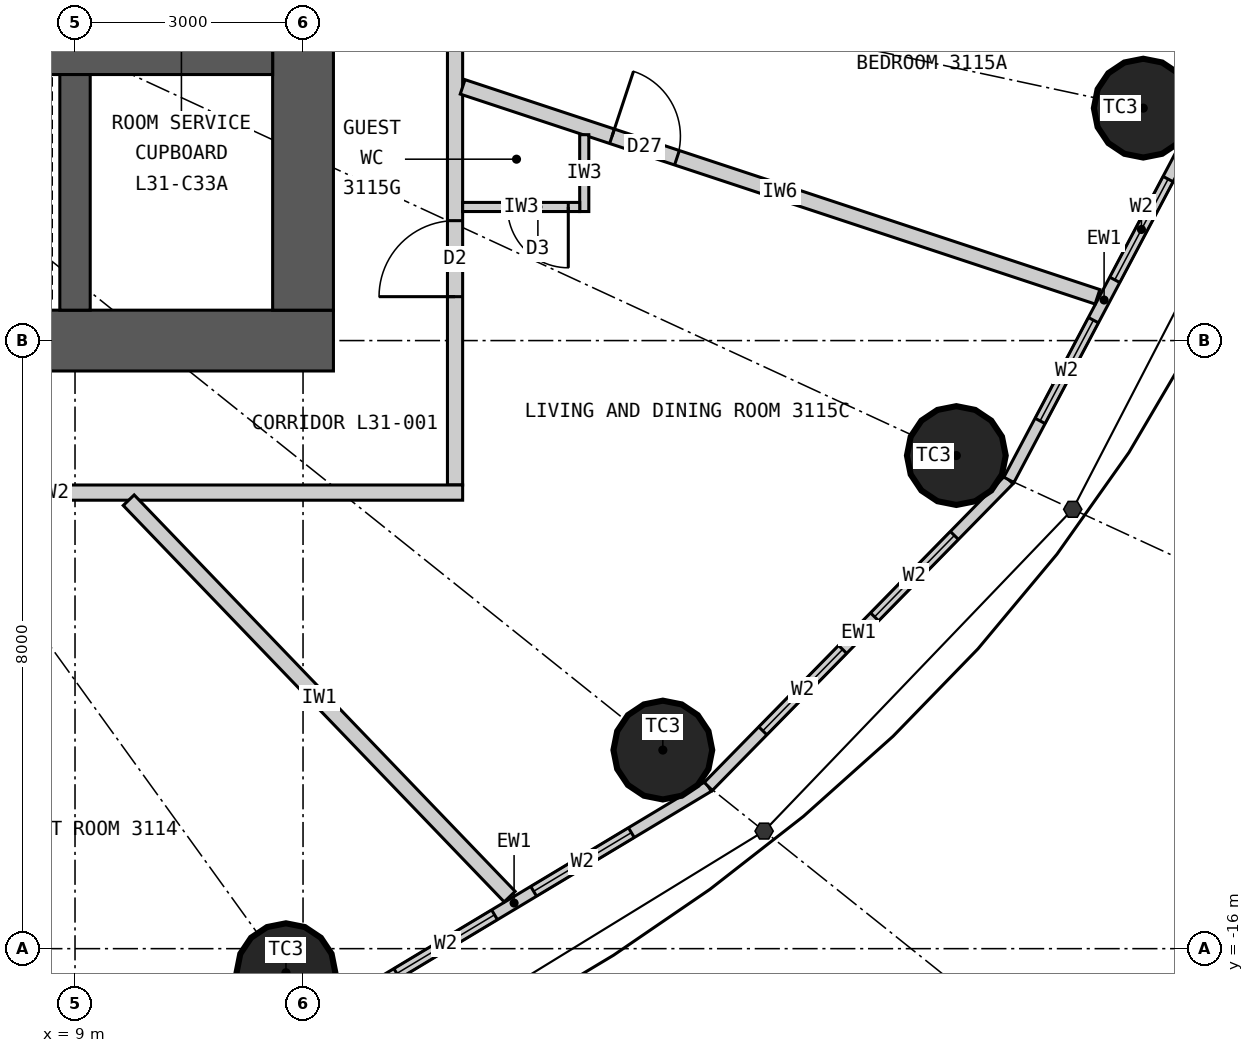
"""IFC4 building model, lengths in metres.
Left out: names, types, materials, properties, quantities, classifications, styles, units other than length and angle.
Written with IfcOpenShell. Run it as: python <this file> out.ifc"""

import sys

from ifc_helpers import new_model, si_unit, direction, frame, frame_2d, origin, origin_2d, place, context, subcontext, project, spatial, rectangle, circle, extrude, element, fill, save


model = new_model("IFC4")
c1 = context("Model", 3, precision=1e-05, world=origin(), true_north=direction((0.0, 1.0)))
c2 = subcontext(c1, "Body", "Model", "MODEL_VIEW")
j1 = project(units=[si_unit("LENGTHUNIT", "METRE"), si_unit("PLANEANGLEUNIT", "RADIAN")], contexts=[c1])
p1 = place(None, origin())
s1 = spatial("IfcSite", under=j1, at=p1, CompositionType="ELEMENT")
p2 = place(p1, origin())
s2 = spatial("IfcBuilding", under=s1, at=p2, CompositionType="ELEMENT")
p3 = place(p2, frame((0.0, 0.0, 122.1)))
s3 = spatial("IfcBuildingStorey", under=s2, at=p3, CompositionType="ELEMENT", Elevation=122.1)
for number, where, z_axis, x_axis in (
    (1, (11.775, -16.316, 0.0), (0.0, 0.0, 1.0), (1.0, 0.0, 0.0)),
    (2, (16.734, -13.387, 0.0), (0.0, 0.0, 1.0), (1.0, 0.0, 0.0)),
    (3, (20.596, -9.513, 0.0), (0.0, 0.0, 1.0), (1.0, 0.0, 0.0)),
    (4, (23.055, -4.942, 0.0), (0.0, 0.0, 1.0), (1.0, 0.0, 0.0)),
):
    element("IfcColumn", number, at=place(p3, frame(where, z_axis=z_axis, x_axis=x_axis)), inside=s3, PredefinedType="COLUMN", context=c2, shape_type="SweptSolid", body=[
        extrude(circle(Radius=0.65, at=origin_2d()), origin(), (0.0, 0.0, 1.0), 3.3),
    ])
p4 = place(p3, frame((12.4, -8.0, 0.0), z_axis=(0.0, 0.0, 1.0), x_axis=(-1.0, 0.0, 0.0)))
e5 = element("IfcWall", 5, at=p4, inside=s3, PredefinedType="SHEAR", context=c2, shape_type="SweptSolid", body=[
    extrude(rectangle(XDim=24.8, YDim=0.8, at=frame_2d((12.4, 0.0))), origin(), (0.0, 0.0, 1.0), 3.3),
])
p5 = place(p4, frame((11.1, 0.0, 0.0)))
e6 = element("IfcOpeningElement", 6, at=p5, cuts=e5, PredefinedType="OPENING", context=c2, shape_type="SweptSolid", body=[
    extrude(rectangle(XDim=1.2, YDim=2.2, at=frame_2d((0.6, 1.1))), frame((0.0, 0.41, 0.0), z_axis=(0.0, -1.0, 0.0), x_axis=(1.0, 0.0, 0.0)), (0.0, 0.0, 1.0), 0.82),
])
p6 = place(p4, frame((18.7, 0.0, 0.0)))
e7 = element("IfcOpeningElement", 7, at=p6, cuts=e5, PredefinedType="OPENING", context=c2, shape_type="SweptSolid", body=[
    extrude(rectangle(XDim=0.9, YDim=2.2, at=frame_2d((0.45, 1.1))), frame((0.0, 0.41, 0.0), z_axis=(0.0, -1.0, 0.0), x_axis=(1.0, 0.0, 0.0)), (0.0, 0.0, 1.0), 0.82),
])
p7 = place(p3, frame((12.0, -7.6, 0.0), z_axis=(0.0, 0.0, 1.0), x_axis=(0.0, 1.0, 0.0)))
e8 = element("IfcWall", 8, at=p7, inside=s3, PredefinedType="SHEAR", context=c2, shape_type="SweptSolid", body=[
    extrude(rectangle(XDim=15.2, YDim=0.8, at=frame_2d((7.6, 0.0))), origin(), (0.0, 0.0, 1.0), 3.3),
])
p8 = place(p7, frame((6.7, 0.0, 0.0)))
e9 = element("IfcOpeningElement", 9, at=p8, cuts=e8, PredefinedType="OPENING", context=c2, shape_type="SweptSolid", body=[
    extrude(rectangle(XDim=1.8, YDim=2.2, at=frame_2d((0.9, 1.1))), frame((0.0, 0.41, 0.0), z_axis=(0.0, -1.0, 0.0), x_axis=(1.0, 0.0, 0.0)), (0.0, 0.0, 1.0), 0.82),
])
p9 = place(p3, frame((-11.6, -4.3, 0.0), z_axis=(0.0, 0.0, 1.0), x_axis=(1.0, 0.0, 0.0)))
e10 = element("IfcWall", 10, at=p9, inside=s3, PredefinedType="SHEAR", context=c2, shape_type="SweptSolid", body=[
    extrude(rectangle(XDim=23.2, YDim=0.4, at=frame_2d((11.6, 0.0))), origin(), (0.0, 0.0, 1.0), 3.3),
])
p10 = place(p3, frame((9.0, -7.6, 0.0), z_axis=(0.0, 0.0, 1.0), x_axis=(0.0, 1.0, 0.0)))
e11 = element("IfcWall", 11, at=p10, inside=s3, PredefinedType="SHEAR", context=c2, shape_type="SweptSolid", body=[
    extrude(rectangle(XDim=3.1, YDim=0.4, at=frame_2d((1.55, 0.0))), origin(), (0.0, 0.0, 1.0), 3.3),
])
p11 = place(p3, frame((12.221, -16.935, 0.0), z_axis=(0.0, 0.0, 1.0), x_axis=(0.857308573723, 0.514802884044, 0.0)))
e12 = element("IfcWall", 12, at=p11, inside=s3, PredefinedType="ELEMENTEDWALL", context=c2, shape_type="SweptSolid", body=[
    extrude(rectangle(XDim=5.961, YDim=0.15, at=frame_2d((2.98, 0.0))), origin(), (0.0, 0.0, 1.0), 3.12),
])
p12 = place(p11, frame((1.181, 0.0, 0.9)))
e13 = element("IfcOpeningElement", 13, at=p12, cuts=e12, PredefinedType="OPENING", context=c2, shape_type="SweptSolid", body=[
    extrude(rectangle(XDim=1.5, YDim=1.9, at=frame_2d((0.75, 0.95))), frame((0.0, 0.085, 0.0), z_axis=(0.0, -1.0, 0.0), x_axis=(1.0, 0.0, 0.0)), (0.0, 0.0, 1.0), 0.17),
])
p13 = place(p11, frame((3.281, 0.0, 0.9)))
e14 = element("IfcOpeningElement", 14, at=p13, cuts=e12, PredefinedType="OPENING", context=c2, shape_type="SweptSolid", body=[
    extrude(rectangle(XDim=1.5, YDim=1.9, at=frame_2d((0.75, 0.95))), frame((0.0, 0.085, 0.0), z_axis=(0.0, -1.0, 0.0), x_axis=(1.0, 0.0, 0.0)), (0.0, 0.0, 1.0), 0.17),
])
p14 = place(p3, frame((17.332, -13.866, 0.0), z_axis=(0.0, 0.0, 1.0), x_axis=(0.700136650834, 0.714008872605, 0.0)))
e15 = element("IfcWall", 15, at=p14, inside=s3, PredefinedType="ELEMENTEDWALL", context=c2, shape_type="SweptSolid", body=[
    extrude(rectangle(XDim=5.649, YDim=0.15, at=frame_2d((2.825, 0.0))), origin(), (0.0, 0.0, 1.0), 3.12),
])
p15 = place(p14, frame((1.025, 0.0, 0.9)))
e16 = element("IfcOpeningElement", 16, at=p15, cuts=e15, PredefinedType="OPENING", context=c2, shape_type="SweptSolid", body=[
    extrude(rectangle(XDim=1.5, YDim=1.9, at=frame_2d((0.75, 0.95))), frame((0.0, 0.085, 0.0), z_axis=(0.0, -1.0, 0.0), x_axis=(1.0, 0.0, 0.0)), (0.0, 0.0, 1.0), 0.17),
])
p16 = place(p14, frame((3.125, 0.0, 0.9)))
e17 = element("IfcOpeningElement", 17, at=p16, cuts=e15, PredefinedType="OPENING", context=c2, shape_type="SweptSolid", body=[
    extrude(rectangle(XDim=1.5, YDim=1.9, at=frame_2d((0.75, 0.95))), frame((0.0, 0.085, 0.0), z_axis=(0.0, -1.0, 0.0), x_axis=(1.0, 0.0, 0.0)), (0.0, 0.0, 1.0), 0.17),
])
p17 = place(p3, frame((21.287, -9.832, 0.0), z_axis=(0.0, 0.0, 1.0), x_axis=(0.467814388454, 0.883826735257, 0.0)))
e18 = element("IfcWall", 18, at=p17, inside=s3, PredefinedType="ELEMENTEDWALL", context=c2, shape_type="SweptSolid", body=[
    extrude(rectangle(XDim=5.354, YDim=0.15, at=frame_2d((2.677, 0.0))), origin(), (0.0, 0.0, 1.0), 3.12),
])
p18 = place(p17, frame((0.877, 0.0, 0.9)))
e19 = element("IfcOpeningElement", 19, at=p18, cuts=e18, PredefinedType="OPENING", context=c2, shape_type="SweptSolid", body=[
    extrude(rectangle(XDim=1.5, YDim=1.9, at=frame_2d((0.75, 0.95))), frame((0.0, 0.085, 0.0), z_axis=(0.0, -1.0, 0.0), x_axis=(1.0, 0.0, 0.0)), (0.0, 0.0, 1.0), 0.17),
])
p19 = place(p17, frame((2.977, 0.0, 0.9)))
e20 = element("IfcOpeningElement", 20, at=p19, cuts=e18, PredefinedType="OPENING", context=c2, shape_type="SweptSolid", body=[
    extrude(rectangle(XDim=1.5, YDim=1.9, at=frame_2d((0.75, 0.95))), frame((0.0, 0.085, 0.0), z_axis=(0.0, -1.0, 0.0), x_axis=(1.0, 0.0, 0.0)), (0.0, 0.0, 1.0), 0.17),
])
p20 = place(p3, frame((14.0, -9.9, 0.0), z_axis=(0.0, 0.0, 1.0), x_axis=(0.0, 1.0, 0.0)))
e21 = element("IfcWall", 21, at=p20, inside=s3, PredefinedType="PARTITIONING", context=c2, shape_type="SweptSolid", body=[
    extrude(rectangle(XDim=19.8, YDim=0.2, at=frame_2d((9.9, 0.0))), origin(), (0.0, 0.0, 1.0), 3.12),
])
p21 = place(p20, frame((2.478, 0.0, 0.0)))
e22 = element("IfcOpeningElement", 22, at=p21, cuts=e21, PredefinedType="OPENING", context=c2, shape_type="SweptSolid", body=[
    extrude(rectangle(XDim=1.0, YDim=2.2, at=frame_2d((0.5, 1.1))), frame((0.0, 0.11, 0.0), z_axis=(0.0, -1.0, 0.0), x_axis=(1.0, 0.0, 0.0)), (0.0, 0.0, 1.0), 0.22),
])
p22 = place(p20, frame((8.838, 0.0, 0.0)))
e23 = element("IfcOpeningElement", 23, at=p22, cuts=e21, PredefinedType="OPENING", context=c2, shape_type="SweptSolid", body=[
    extrude(rectangle(XDim=1.0, YDim=2.2, at=frame_2d((0.5, 1.1))), frame((0.0, 0.11, 0.0), z_axis=(0.0, -1.0, 0.0), x_axis=(1.0, 0.0, 0.0)), (0.0, 0.0, 1.0), 0.22),
])
p23 = place(p20, frame((13.742, 0.0, 0.0)))
e24 = element("IfcOpeningElement", 24, at=p23, cuts=e21, PredefinedType="OPENING", context=c2, shape_type="SweptSolid", body=[
    extrude(rectangle(XDim=1.0, YDim=2.2, at=frame_2d((0.5, 1.1))), frame((0.0, 0.11, 0.0), z_axis=(0.0, -1.0, 0.0), x_axis=(1.0, 0.0, 0.0)), (0.0, 0.0, 1.0), 0.22),
])
p24 = place(p20, frame((18.698, 0.0, 0.0)))
e25 = element("IfcOpeningElement", 25, at=p24, cuts=e21, PredefinedType="OPENING", context=c2, shape_type="SweptSolid", body=[
    extrude(rectangle(XDim=1.0, YDim=2.2, at=frame_2d((0.5, 1.1))), frame((0.0, 0.11, 0.0), z_axis=(0.0, -1.0, 0.0), x_axis=(1.0, 0.0, 0.0)), (0.0, 0.0, 1.0), 0.22),
])
p25 = place(p3, frame((14.1, -10.0, 0.0), z_axis=(0.0, 0.0, 1.0), x_axis=(-1.0, 0.0, 0.0)))
e26 = element("IfcWall", 26, at=p25, inside=s3, PredefinedType="PARTITIONING", context=c2, shape_type="SweptSolid", body=[
    extrude(rectangle(XDim=10.817, YDim=0.2, at=frame_2d((5.409, 0.0))), origin(), (0.0, 0.0, 1.0), 3.12),
])
p26 = place(p3, frame((9.706, -10.1, 0.0), z_axis=(0.0, 0.0, 1.0), x_axis=(0.692944801824, -0.720990639069, 0.0)))
e27 = element("IfcWall", 27, at=p26, inside=s3, PredefinedType="PARTITIONING", context=c2, shape_type="SweptSolid", body=[
    extrude(rectangle(XDim=7.234, YDim=0.2, at=frame_2d((3.617, 0.0))), origin(), (0.0, 0.0, 1.0), 3.12),
])
p27 = place(p3, frame((14.1, -4.662, 0.0), z_axis=(0.0, 0.0, 1.0), x_axis=(0.949446466373, -0.313928984789, 0.0)))
e28 = element("IfcWall", 28, at=p27, inside=s3, PredefinedType="PARTITIONING", context=c2, shape_type="SweptSolid", body=[
    extrude(rectangle(XDim=8.797, YDim=0.2, at=frame_2d((4.399, 0.0))), origin(), (0.0, 0.0, 1.0), 3.12),
])
p28 = place(p27, frame((2.07, 0.0, 0.0)))
e29 = element("IfcOpeningElement", 29, at=p28, cuts=e28, PredefinedType="OPENING", context=c2, shape_type="SweptSolid", body=[
    extrude(rectangle(XDim=0.9, YDim=2.1, at=frame_2d((0.45, 1.05))), frame((0.0, 0.11, 0.0), z_axis=(0.0, -1.0, 0.0), x_axis=(1.0, 0.0, 0.0)), (0.0, 0.0, 1.0), 0.22),
])
p29 = place(p3, frame((15.7, -5.291, 0.0), z_axis=(0.0, 0.0, 1.0), x_axis=(0.0, -1.0, 0.0)))
e30 = element("IfcWall", 30, at=p29, inside=s3, PredefinedType="PARTITIONING", context=c2, shape_type="SweptSolid", body=[
    extrude(rectangle(XDim=1.011, YDim=0.12, at=frame_2d((0.505, 0.0))), origin(), (0.0, 0.0, 1.0), 3.12),
])
p30 = place(p3, frame((14.1, -6.242, 0.0), z_axis=(0.0, 0.0, 1.0), x_axis=(1.0, 0.0, 0.0)))
e31 = element("IfcWall", 31, at=p30, inside=s3, PredefinedType="PARTITIONING", context=c2, shape_type="SweptSolid", body=[
    extrude(rectangle(XDim=1.54, YDim=0.12, at=frame_2d((0.77, 0.0))), origin(), (0.0, 0.0, 1.0), 3.12),
])
p31 = place(p30, frame((0.59, 0.0, 0.0)))
e32 = element("IfcOpeningElement", 32, at=p31, cuts=e31, PredefinedType="OPENING", context=c2, shape_type="SweptSolid", body=[
    extrude(rectangle(XDim=0.8, YDim=2.1, at=frame_2d((0.4, 1.05))), frame((0.0, 0.07, 0.0), z_axis=(0.0, -1.0, 0.0), x_axis=(1.0, 0.0, 0.0)), (0.0, 0.0, 1.0), 0.14),
])
p32 = place(p12, origin())
e33 = element("IfcWindow", 33, at=p32, inside=s3, PartitioningType="SINGLE_PANEL", PredefinedType="WINDOW", context=c2, shape_type="SweptSolid", body=[
    extrude(rectangle(XDim=1.5, YDim=1.9, at=frame_2d((0.75, 0.95))), frame((0.0, 0.03, 0.0), z_axis=(0.0, -1.0, 0.0), x_axis=(1.0, 0.0, 0.0)), (0.0, 0.0, 1.0), 0.06),
])
fill(e13, e33)
p33 = place(p13, origin())
e34 = element("IfcWindow", 34, at=p33, inside=s3, PartitioningType="SINGLE_PANEL", PredefinedType="WINDOW", context=c2, shape_type="SweptSolid", body=[
    extrude(rectangle(XDim=1.5, YDim=1.9, at=frame_2d((0.75, 0.95))), frame((0.0, 0.03, 0.0), z_axis=(0.0, -1.0, 0.0), x_axis=(1.0, 0.0, 0.0)), (0.0, 0.0, 1.0), 0.06),
])
fill(e14, e34)
p34 = place(p15, origin())
e35 = element("IfcWindow", 35, at=p34, inside=s3, PartitioningType="SINGLE_PANEL", PredefinedType="WINDOW", context=c2, shape_type="SweptSolid", body=[
    extrude(rectangle(XDim=1.5, YDim=1.9, at=frame_2d((0.75, 0.95))), frame((0.0, 0.03, 0.0), z_axis=(0.0, -1.0, 0.0), x_axis=(1.0, 0.0, 0.0)), (0.0, 0.0, 1.0), 0.06),
])
fill(e16, e35)
p35 = place(p16, origin())
e36 = element("IfcWindow", 36, at=p35, inside=s3, PartitioningType="SINGLE_PANEL", PredefinedType="WINDOW", context=c2, shape_type="SweptSolid", body=[
    extrude(rectangle(XDim=1.5, YDim=1.9, at=frame_2d((0.75, 0.95))), frame((0.0, 0.03, 0.0), z_axis=(0.0, -1.0, 0.0), x_axis=(1.0, 0.0, 0.0)), (0.0, 0.0, 1.0), 0.06),
])
fill(e17, e36)
p36 = place(p18, origin())
e37 = element("IfcWindow", 37, at=p36, inside=s3, PartitioningType="SINGLE_PANEL", PredefinedType="WINDOW", context=c2, shape_type="SweptSolid", body=[
    extrude(rectangle(XDim=1.5, YDim=1.9, at=frame_2d((0.75, 0.95))), frame((0.0, 0.03, 0.0), z_axis=(0.0, -1.0, 0.0), x_axis=(1.0, 0.0, 0.0)), (0.0, 0.0, 1.0), 0.06),
])
fill(e19, e37)
p37 = place(p19, origin())
e38 = element("IfcWindow", 38, at=p37, inside=s3, PartitioningType="SINGLE_PANEL", PredefinedType="WINDOW", context=c2, shape_type="SweptSolid", body=[
    extrude(rectangle(XDim=1.5, YDim=1.9, at=frame_2d((0.75, 0.95))), frame((0.0, 0.03, 0.0), z_axis=(0.0, -1.0, 0.0), x_axis=(1.0, 0.0, 0.0)), (0.0, 0.0, 1.0), 0.06),
])
fill(e20, e38)
p38 = place(p31, origin())
e39 = element("IfcDoor", 39, at=p38, inside=s3, OperationType="SINGLE_SWING_RIGHT", PredefinedType="DOOR", context=c2, shape_type="SweptSolid", body=[
    extrude(rectangle(XDim=0.8, YDim=2.1, at=frame_2d((0.4, 1.05))), frame((0.0, 0.025, 0.0), z_axis=(0.0, -1.0, 0.0), x_axis=(1.0, 0.0, 0.0)), (0.0, 0.0, 1.0), 0.05),
])
fill(e32, e39)
p39 = place(p21, origin())
e40 = element("IfcDoor", 40, at=p39, inside=s3, OperationType="SINGLE_SWING_LEFT", PredefinedType="DOOR", context=c2, shape_type="SweptSolid", body=[
    extrude(rectangle(XDim=1.0, YDim=2.2, at=frame_2d((0.5, 1.1))), frame((0.0, 0.025, 0.0), z_axis=(0.0, -1.0, 0.0), x_axis=(1.0, 0.0, 0.0)), (0.0, 0.0, 1.0), 0.05),
])
fill(e22, e40)
p40 = place(p28, origin())
e41 = element("IfcDoor", 41, at=p40, inside=s3, OperationType="SINGLE_SWING_LEFT", PredefinedType="DOOR", context=c2, shape_type="SweptSolid", body=[
    extrude(rectangle(XDim=0.9, YDim=2.1, at=frame_2d((0.45, 1.05))), frame((0.0, 0.025, 0.0), z_axis=(0.0, -1.0, 0.0), x_axis=(1.0, 0.0, 0.0)), (0.0, 0.0, 1.0), 0.05),
])
fill(e29, e41)
save(model, sys.argv[1])
